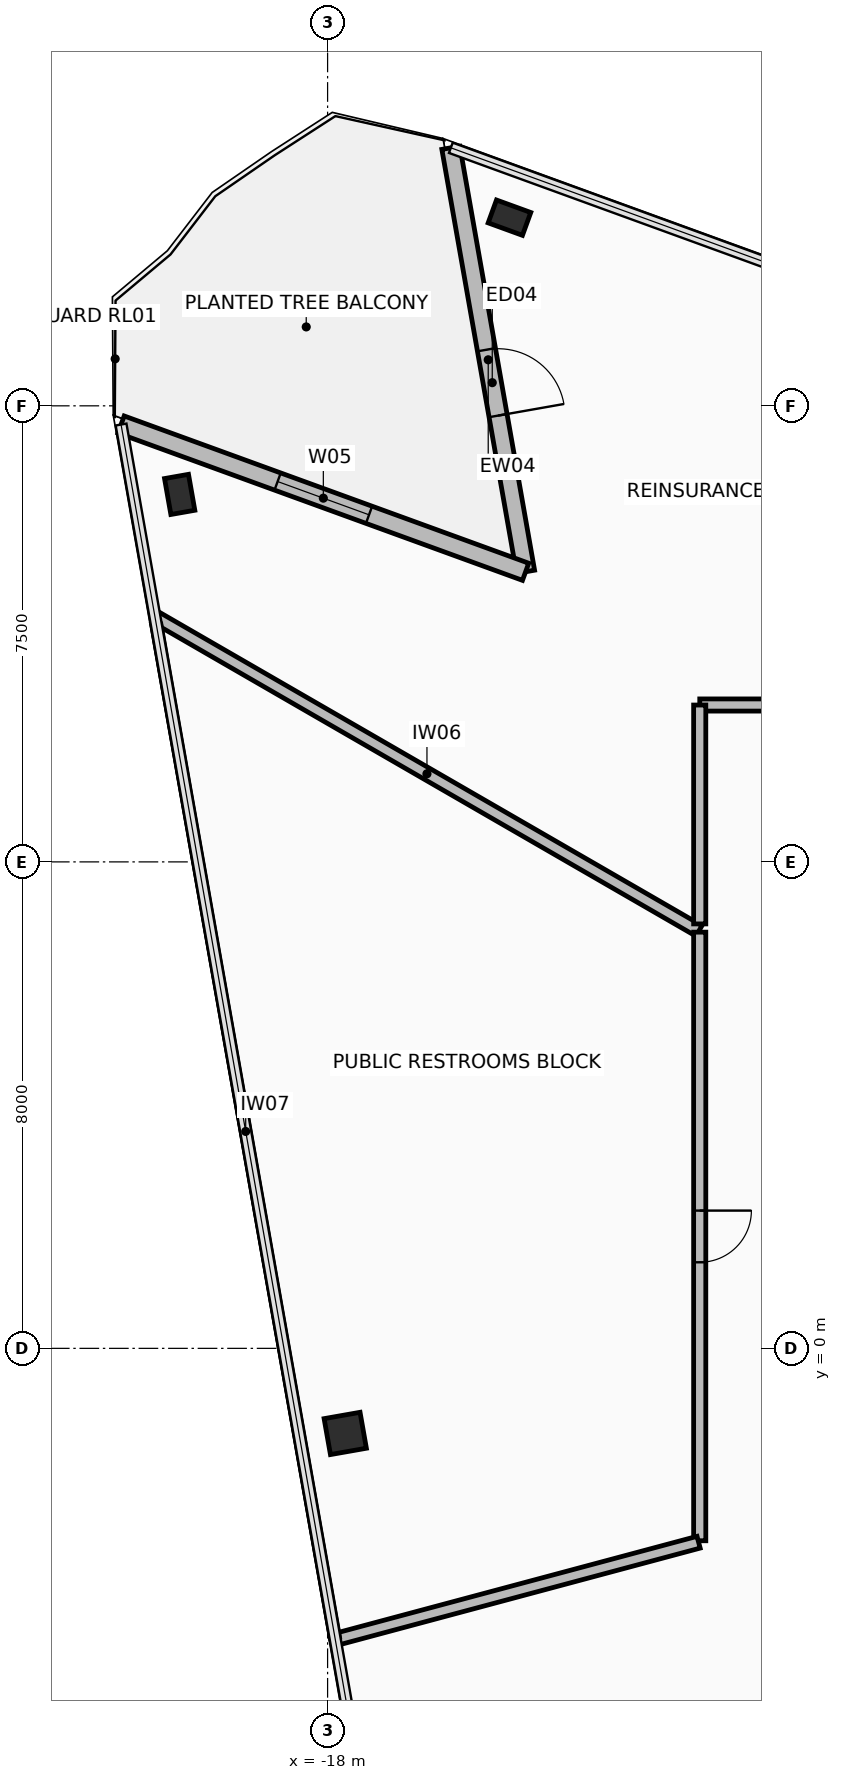
"""IFC4 building model, lengths in metres.
Left out: names, types, materials, properties, quantities, classifications, styles, units other than length and angle.
Written with IfcOpenShell. Run it as: python <this file> out.ifc"""

import sys

from ifc_helpers import new_model, si_unit, direction, frame, frame_2d, origin, origin_2d, place, context, subcontext, project, spatial, rectangle, hollow_rectangle, extrude, element, fill, save


model = new_model("IFC4")
c1 = context("Model", 3, precision=1e-05, world=origin(), true_north=direction((0.0, 1.0)))
c2 = subcontext(c1, "Body", "Model", "MODEL_VIEW")
j1 = project(units=[si_unit("LENGTHUNIT", "METRE"), si_unit("PLANEANGLEUNIT", "RADIAN")], contexts=[c1])
p1 = place(None, origin())
s1 = spatial("IfcSite", under=j1, at=p1, CompositionType="ELEMENT")
p2 = place(p1, origin())
s2 = spatial("IfcBuilding", under=s1, at=p2, CompositionType="ELEMENT")
p3 = place(p2, frame((0.0, 0.0, 177.7)))
s3 = spatial("IfcBuildingStorey", under=s2, at=p3, CompositionType="ELEMENT", Elevation=177.7)
p4 = place(p3, frame((-20.433, 14.043, 0.0), z_axis=(0.0, 0.0, 1.0), x_axis=(-0.173648177667, 0.984807753012, 0.0)))
e1 = element("IfcColumn", 1, at=p4, inside=s3, PredefinedType="COLUMN", context=c2, shape_type="SweptSolid", body=[
    extrude(hollow_rectangle(XDim=0.4, YDim=0.6, WallThickness=0.03, at=origin_2d()), origin(), (0.0, 0.0, 1.0), 3.6),
])
p5 = place(p3, frame((-17.71, -1.399, 0.0), z_axis=(0.0, 0.0, 1.0), x_axis=(-0.173648177667, 0.984807753012, 0.0)))
e2 = element("IfcColumn", 2, at=p5, inside=s3, PredefinedType="COLUMN", context=c2, shape_type="SweptSolid", body=[
    extrude(hollow_rectangle(XDim=0.6, YDim=0.6, WallThickness=0.036, at=origin_2d()), origin(), (0.0, 0.0, 1.0), 3.6),
])
p6 = place(p3, frame((-15.009, 18.594, 0.0), z_axis=(0.0, 0.0, 1.0), x_axis=(-0.939692023847, 0.342021783398, 0.0)))
e3 = element("IfcColumn", 3, at=p6, inside=s3, PredefinedType="COLUMN", context=c2, shape_type="SweptSolid", body=[
    extrude(hollow_rectangle(XDim=0.4, YDim=0.6, WallThickness=0.03, at=origin_2d()), origin(), (0.0, 0.0, 1.0), 3.6),
])
p7 = place(p3, frame((-15.973, 19.743, 0.0), z_axis=(0.0, 0.0, 1.0), x_axis=(0.173651569749, -0.984807154891, 0.0)))
e4 = element("IfcWall", 4, at=p7, inside=s3, PredefinedType="STANDARD", context=c2, shape_type="SweptSolid", body=[
    extrude(rectangle(XDim=7.08, YDim=0.3, at=frame_2d((3.54, 0.0))), origin(), (0.0, 0.0, 1.0), 2.715),
])
p8 = place(p7, frame((3.372, 0.0, 0.0)))
e5 = element("IfcOpeningElement", 5, at=p8, cuts=e4, PredefinedType="OPENING", context=c2, shape_type="SweptSolid", body=[
    extrude(rectangle(XDim=1.1, YDim=2.2, at=frame_2d((0.55, 1.1))), frame((0.0, 0.16, 0.0), z_axis=(0.0, -1.0, 0.0), x_axis=(1.0, 0.0, 0.0)), (0.0, 0.0, 1.0), 0.32),
])
p9 = place(p3, frame((-14.744, 12.771, 0.0), z_axis=(0.0, 0.0, 1.0), x_axis=(-0.939687665182, 0.342033758429, 0.0)))
e6 = element("IfcWall", 6, at=p9, inside=s3, PredefinedType="STANDARD", context=c2, shape_type="SweptSolid", body=[
    extrude(rectangle(XDim=7.08, YDim=0.3, at=frame_2d((3.54, 0.0))), origin(), (0.0, 0.0, 1.0), 2.715),
])
p10 = place(p9, frame((2.74, 0.0, 0.335)))
e7 = element("IfcOpeningElement", 7, at=p10, cuts=e6, PredefinedType="OPENING", context=c2, shape_type="SweptSolid", body=[
    extrude(rectangle(XDim=1.6, YDim=2.2, at=frame_2d((0.8, 1.1))), frame((0.0, 0.16, 0.0), z_axis=(0.0, -1.0, 0.0), x_axis=(1.0, 0.0, 0.0)), (0.0, 0.0, 1.0), 0.32),
])
p11 = place(p3, frame((-20.839, 12.031, 0.0), z_axis=(0.0, 0.0, 1.0), x_axis=(0.866031318101, -0.499989755964, 0.0)))
e8 = element("IfcWall", 8, at=p11, inside=s3, PredefinedType="PARTITIONING", context=c2, shape_type="SweptSolid", body=[
    extrude(rectangle(XDim=10.331, YDim=0.2, at=frame_2d((5.166, 0.0))), origin(), (0.0, 0.0, 1.0), 2.715),
])
p12 = place(p3, frame((-11.88, 6.844, 0.0), z_axis=(0.0, 0.0, 1.0), x_axis=(0.0, -1.0, 0.0)))
e9 = element("IfcWall", 9, at=p12, inside=s3, PredefinedType="PARTITIONING", context=c2, shape_type="SweptSolid", body=[
    extrude(rectangle(XDim=10.009, YDim=0.2, at=frame_2d((5.004, 0.0))), origin(), (0.0, 0.0, 1.0), 3.42),
])
p13 = place(p12, frame((4.579, 0.0, 0.0)))
e10 = element("IfcOpeningElement", 10, at=p13, cuts=e9, PredefinedType="OPENING", context=c2, shape_type="SweptSolid", body=[
    extrude(rectangle(XDim=0.85, YDim=2.1, at=frame_2d((0.425, 1.05))), frame((0.0, 0.11, 0.0), z_axis=(0.0, -1.0, 0.0), x_axis=(1.0, 0.0, 0.0)), (0.0, 0.0, 1.0), 0.22),
])
p14 = place(p3, frame((-11.898, -3.188, 0.0), z_axis=(0.0, 0.0, 1.0), x_axis=(-0.965934250079, -0.258787605045, 0.0)))
e11 = element("IfcWall", 11, at=p14, inside=s3, PredefinedType="PARTITIONING", context=c2, shape_type="SweptSolid", body=[
    extrude(rectangle(XDim=6.158, YDim=0.2, at=frame_2d((3.079, 0.0))), origin(), (0.0, 0.0, 1.0), 2.715),
])
p15 = place(p3, frame((-17.878, -4.762, 0.0), z_axis=(0.0, 0.0, 1.0), x_axis=(-0.173655243618, 0.984806507068, 0.0)))
e12 = element("IfcWall", 12, at=p15, inside=s3, PredefinedType="PARTITIONING", context=c2, shape_type="SweptSolid", body=[
    extrude(rectangle(XDim=16.916, YDim=0.15, at=frame_2d((8.458, 0.0))), origin(), (0.0, 0.0, 1.0), 3.42),
])
p16 = place(p3, frame((-2.944, 10.58, 0.0), z_axis=(0.0, 0.0, 1.0), x_axis=(-1.0, 0.0, 0.0)))
e13 = element("IfcWall", 13, at=p16, inside=s3, PredefinedType="PARTITIONING", context=c2, shape_type="SweptSolid", body=[
    extrude(rectangle(XDim=8.936, YDim=0.2, at=frame_2d((4.468, 0.0))), origin(), (0.0, 0.0, 1.0), 2.765),
])
p17 = place(p16, frame((3.968, 0.0, 0.0)))
e14 = element("IfcOpeningElement", 14, at=p17, cuts=e13, PredefinedType="OPENING", context=c2, shape_type="SweptSolid", body=[
    extrude(rectangle(XDim=1.0, YDim=2.15, at=frame_2d((0.5, 1.075))), frame((0.0, 0.11, 0.0), z_axis=(0.0, -1.0, 0.0), x_axis=(1.0, 0.0, 0.0)), (0.0, 0.0, 1.0), 0.22),
])
p18 = place(p3, frame((-11.88, 10.579, 0.0), z_axis=(0.0, 0.0, 1.0), x_axis=(0.0, -1.0, 0.0)))
e15 = element("IfcWall", 15, at=p18, inside=s3, PredefinedType="PARTITIONING", context=c2, shape_type="SweptSolid", body=[
    extrude(rectangle(XDim=3.599, YDim=0.2, at=frame_2d((1.8, 0.0))), origin(), (0.0, 0.0, 1.0), 2.765),
])
p19 = place(p8, frame((1.1, 0.0, 0.0), z_axis=(0.0, 0.0, 1.0), x_axis=(-1.0, 0.0, 0.0)))
e16 = element("IfcDoor", 16, at=p19, inside=s3, OperationType="SINGLE_SWING_LEFT", PredefinedType="DOOR", context=c2, shape_type="SweptSolid", body=[
    extrude(rectangle(XDim=1.1, YDim=2.2, at=frame_2d((0.55, 1.1))), frame((0.0, 0.025, 0.0), z_axis=(0.0, -1.0, 0.0), x_axis=(1.0, 0.0, 0.0)), (0.0, 0.0, 1.0), 0.05),
])
fill(e5, e16)
p20 = place(p10, origin())
e17 = element("IfcWindow", 17, at=p20, inside=s3, PartitioningType="SINGLE_PANEL", PredefinedType="WINDOW", context=c2, shape_type="SweptSolid", body=[
    extrude(rectangle(XDim=1.6, YDim=2.2, at=frame_2d((0.8, 1.1))), frame((0.0, 0.03, 0.0), z_axis=(0.0, -1.0, 0.0), x_axis=(1.0, 0.0, 0.0)), (0.0, 0.0, 1.0), 0.06),
])
fill(e7, e17)
p21 = place(p13, origin())
e18 = element("IfcDoor", 18, at=p21, inside=s3, OperationType="SINGLE_SWING_RIGHT", PredefinedType="DOOR", context=c2, shape_type="SweptSolid", body=[
    extrude(rectangle(XDim=0.85, YDim=2.1, at=frame_2d((0.425, 1.05))), frame((0.0, 0.025, 0.0), z_axis=(0.0, -1.0, 0.0), x_axis=(1.0, 0.0, 0.0)), (0.0, 0.0, 1.0), 0.05),
])
fill(e10, e18)
save(model, sys.argv[1])
